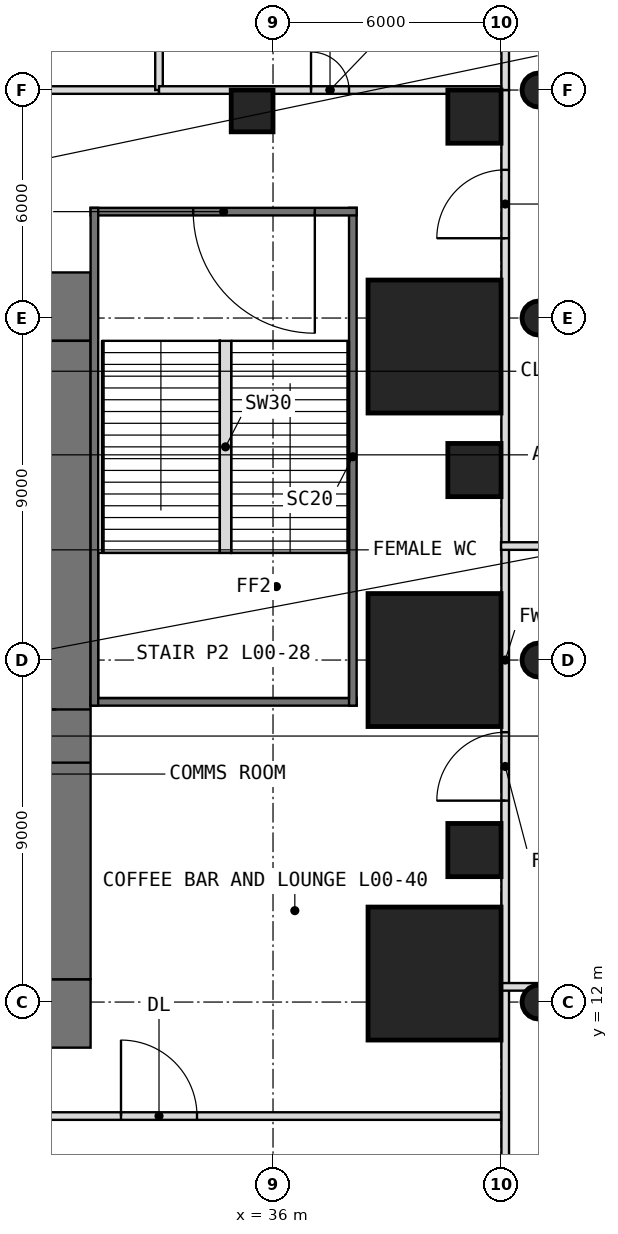
"""IFC4 building model, lengths in metres.
Left out: names, types, materials, properties, quantities, classifications, styles, units other than length and angle.
Written with IfcOpenShell. Run it as: python <this file> out.ifc"""

import sys

from ifc_helpers import new_model, si_unit, direction, frame, frame_2d, origin, origin_2d, place, context, subcontext, project, spatial, rectangle, circle, extrude, element, fill, save


model = new_model("IFC4")
c1 = context("Model", 3, precision=1e-05, world=origin(), true_north=direction((0.0, 1.0)))
c2 = subcontext(c1, "Body", "Model", "MODEL_VIEW")
j1 = project(units=[si_unit("LENGTHUNIT", "METRE"), si_unit("PLANEANGLEUNIT", "RADIAN")], contexts=[c1])
p1 = place(None, origin())
s1 = spatial("IfcSite", under=j1, at=p1, CompositionType="ELEMENT")
p2 = place(p1, origin())
s2 = spatial("IfcBuilding", under=s1, at=p2, CompositionType="ELEMENT")
p3 = place(p2, origin())
s3 = spatial("IfcBuildingStorey", under=s2, at=p3, CompositionType="ELEMENT", Elevation=0.0)
p4 = place(p3, frame((40.25, 12.75, -0.4), z_axis=(0.0, 0.0, 1.0), x_axis=(1.0, 0.0, 0.0)))
e1 = element("IfcColumn", 1, at=p4, inside=s3, PredefinedType="COLUMN", context=c2, shape_type="SweptSolid", body=[
    extrude(rectangle(XDim=3.5, YDim=3.5, at=origin_2d()), origin(), (0.0, 0.0, 1.0), 6.4),
])
p5 = place(p3, frame((43.0, 12.0, -0.4), z_axis=(0.0, 0.0, 1.0), x_axis=(1.0, 0.0, 0.0)))
e2 = element("IfcColumn", 2, at=p5, inside=s3, PredefinedType="COLUMN", context=c2, shape_type="SweptSolid", body=[
    extrude(circle(Radius=0.45, at=origin_2d()), origin(), (0.0, 0.0, 1.0), 6.4),
])
p6 = place(p3, frame((41.3, 16.0, -0.4), z_axis=(0.0, 0.0, 1.0), x_axis=(1.0, 0.0, 0.0)))
e3 = element("IfcColumn", 3, at=p6, inside=s3, PredefinedType="COLUMN", context=c2, shape_type="SweptSolid", body=[
    extrude(rectangle(XDim=1.4, YDim=1.4, at=origin_2d()), origin(), (0.0, 0.0, 1.0), 6.4),
])
p7 = place(p3, frame((40.25, 21.0, -0.4), z_axis=(0.0, 0.0, 1.0), x_axis=(1.0, 0.0, 0.0)))
e4 = element("IfcColumn", 4, at=p7, inside=s3, PredefinedType="COLUMN", context=c2, shape_type="SweptSolid", body=[
    extrude(rectangle(XDim=3.5, YDim=3.5, at=origin_2d()), origin(), (0.0, 0.0, 1.0), 6.4),
])
p8 = place(p3, frame((43.0, 21.0, -0.4), z_axis=(0.0, 0.0, 1.0), x_axis=(1.0, 0.0, 0.0)))
e5 = element("IfcColumn", 5, at=p8, inside=s3, PredefinedType="COLUMN", context=c2, shape_type="SweptSolid", body=[
    extrude(circle(Radius=0.45, at=origin_2d()), origin(), (0.0, 0.0, 1.0), 6.4),
])
p9 = place(p3, frame((41.3, 26.0, -0.4), z_axis=(0.0, 0.0, 1.0), x_axis=(1.0, 0.0, 0.0)))
e6 = element("IfcColumn", 6, at=p9, inside=s3, PredefinedType="COLUMN", context=c2, shape_type="SweptSolid", body=[
    extrude(rectangle(XDim=1.4, YDim=1.4, at=origin_2d()), origin(), (0.0, 0.0, 1.0), 6.4),
])
p10 = place(p3, frame((43.0, 30.0, -0.4), z_axis=(0.0, 0.0, 1.0), x_axis=(1.0, 0.0, 0.0)))
e7 = element("IfcColumn", 7, at=p10, inside=s3, PredefinedType="COLUMN", context=c2, shape_type="SweptSolid", body=[
    extrude(circle(Radius=0.45, at=origin_2d()), origin(), (0.0, 0.0, 1.0), 6.4),
])
p11 = place(p3, frame((40.25, 29.25, -0.4), z_axis=(0.0, 0.0, 1.0), x_axis=(1.0, 0.0, 0.0)))
e8 = element("IfcColumn", 8, at=p11, inside=s3, PredefinedType="COLUMN", context=c2, shape_type="SweptSolid", body=[
    extrude(rectangle(XDim=3.5, YDim=3.5, at=origin_2d()), origin(), (0.0, 0.0, 1.0), 6.4),
])
p12 = place(p3, frame((35.45, 35.45, -0.4), z_axis=(0.0, 0.0, 1.0), x_axis=(1.0, 0.0, 0.0)))
e9 = element("IfcColumn", 9, at=p12, inside=s3, PredefinedType="COLUMN", context=c2, shape_type="SweptSolid", body=[
    extrude(rectangle(XDim=1.1, YDim=1.1, at=origin_2d()), origin(), (0.0, 0.0, 1.0), 6.4),
])
p13 = place(p3, frame((41.3, 35.3, -0.4), z_axis=(0.0, 0.0, 1.0), x_axis=(1.0, 0.0, 0.0)))
e10 = element("IfcColumn", 10, at=p13, inside=s3, PredefinedType="COLUMN", context=c2, shape_type="SweptSolid", body=[
    extrude(rectangle(XDim=1.4, YDim=1.4, at=origin_2d()), origin(), (0.0, 0.0, 1.0), 6.4),
])
p14 = place(p3, frame((43.0, 36.0, -0.4), z_axis=(0.0, 0.0, 1.0), x_axis=(1.0, 0.0, 0.0)))
e11 = element("IfcColumn", 11, at=p14, inside=s3, PredefinedType="COLUMN", context=c2, shape_type="SweptSolid", body=[
    extrude(circle(Radius=0.45, at=origin_2d()), origin(), (0.0, 0.0, 1.0), 6.4),
])
p15 = place(p3, frame((10.8, 11.7, 0.0), z_axis=(0.0, 0.0, 1.0), x_axis=(1.0, 0.0, 0.0)))
e12 = element("IfcWall", 12, at=p15, inside=s3, PredefinedType="SHEAR", context=c2, shape_type="SweptSolid", body=[
    extrude(rectangle(XDim=20.4, YDim=1.8, at=frame_2d((10.2, 0.0))), origin(), (0.0, 0.0, 1.0), 5.8),
])
p16 = place(p15, frame((9.2, 0.0, 0.0)))
e13 = element("IfcOpeningElement", 13, at=p16, cuts=e12, PredefinedType="OPENING", context=c2, shape_type="SweptSolid", body=[
    extrude(rectangle(XDim=2.0, YDim=2.2, at=frame_2d((1.0, 1.1))), frame((0.0, 0.91, 0.0), z_axis=(0.0, -1.0, 0.0), x_axis=(1.0, 0.0, 0.0)), (0.0, 0.0, 1.0), 1.82),
])
p17 = place(p3, frame((10.8, 30.3, 0.0), z_axis=(0.0, 0.0, 1.0), x_axis=(1.0, 0.0, 0.0)))
e14 = element("IfcWall", 14, at=p17, inside=s3, PredefinedType="SHEAR", context=c2, shape_type="SweptSolid", body=[
    extrude(rectangle(XDim=20.4, YDim=1.8, at=frame_2d((10.2, 0.0))), origin(), (0.0, 0.0, 1.0), 5.8),
])
p18 = place(p17, frame((9.2, 0.0, 0.0)))
e15 = element("IfcOpeningElement", 15, at=p18, cuts=e14, PredefinedType="OPENING", context=c2, shape_type="SweptSolid", body=[
    extrude(rectangle(XDim=2.0, YDim=2.2, at=frame_2d((1.0, 1.1))), frame((0.0, 0.91, 0.0), z_axis=(0.0, -1.0, 0.0), x_axis=(1.0, 0.0, 0.0)), (0.0, 0.0, 1.0), 1.82),
])
p19 = place(p3, frame((30.3, 12.6, 0.0), z_axis=(0.0, 0.0, 1.0), x_axis=(0.0, 1.0, 0.0)))
e16 = element("IfcWall", 16, at=p19, inside=s3, PredefinedType="SHEAR", context=c2, shape_type="SweptSolid", body=[
    extrude(rectangle(XDim=16.8, YDim=1.8, at=frame_2d((8.4, 0.0))), origin(), (0.0, 0.0, 1.0), 5.8),
])
p20 = place(p19, frame((5.7, 0.0, 0.0)))
e17 = element("IfcOpeningElement", 17, at=p20, cuts=e16, PredefinedType="OPENING", context=c2, shape_type="SweptSolid", body=[
    extrude(rectangle(XDim=1.4, YDim=2.2, at=frame_2d((0.7, 1.1))), frame((0.0, 0.91, 0.0), z_axis=(0.0, -1.0, 0.0), x_axis=(1.0, 0.0, 0.0)), (0.0, 0.0, 1.0), 1.82),
])
p21 = place(p3, frame((31.2, 19.9, 0.0), z_axis=(0.0, 0.0, 1.0), x_axis=(1.0, 0.0, 0.0)))
e18 = element("IfcWall", 18, at=p21, inside=s3, PredefinedType="SOLIDWALL", context=c2, shape_type="SweptSolid", body=[
    extrude(rectangle(XDim=7.0, YDim=0.2, at=frame_2d((3.5, 0.0))), origin(), (0.0, 0.0, 1.0), 5.8),
])
p22 = place(p3, frame((38.1, 19.8, 0.0), z_axis=(0.0, 0.0, 1.0), x_axis=(0.0, 1.0, 0.0)))
e19 = element("IfcWall", 19, at=p22, inside=s3, PredefinedType="SOLIDWALL", context=c2, shape_type="SweptSolid", body=[
    extrude(rectangle(XDim=13.1, YDim=0.2, at=frame_2d((6.55, 0.0))), origin(), (0.0, 0.0, 1.0), 5.8),
])
p23 = place(p3, frame((38.2, 32.8, 0.0), z_axis=(0.0, 0.0, 1.0), x_axis=(-1.0, 0.0, 0.0)))
e20 = element("IfcWall", 20, at=p23, inside=s3, PredefinedType="SOLIDWALL", context=c2, shape_type="SweptSolid", body=[
    extrude(rectangle(XDim=7.0, YDim=0.2, at=frame_2d((3.5, 0.0))), origin(), (0.0, 0.0, 1.0), 5.8),
])
p24 = place(p23, frame((1.1, 0.0, 0.0)))
e21 = element("IfcOpeningElement", 21, at=p24, cuts=e20, PredefinedType="OPENING", context=c2, shape_type="SweptSolid", body=[
    extrude(rectangle(XDim=3.2, YDim=2.4, at=frame_2d((1.6, 1.2))), frame((0.0, 0.11, 0.0), z_axis=(0.0, -1.0, 0.0), x_axis=(1.0, 0.0, 0.0)), (0.0, 0.0, 1.0), 0.22),
])
p25 = place(p3, frame((31.3, 32.9, 0.0), z_axis=(0.0, 0.0, 1.0), x_axis=(0.0, -1.0, 0.0)))
e22 = element("IfcWall", 22, at=p25, inside=s3, PredefinedType="SOLIDWALL", context=c2, shape_type="SweptSolid", body=[
    extrude(rectangle(XDim=13.1, YDim=0.2, at=frame_2d((6.55, 0.0))), origin(), (0.0, 0.0, 1.0), 5.8),
])
p26 = place(p3, frame((42.11, 6.0, 0.0), z_axis=(0.0, 0.0, 1.0), x_axis=(0.0, 1.0, 0.0)))
e23 = element("IfcWall", 23, at=p26, inside=s3, PredefinedType="PARTITIONING", context=c2, shape_type="SweptSolid", body=[
    extrude(rectangle(XDim=30.0, YDim=0.2, at=frame_2d((15.0, 0.0))), origin(), (0.0, 0.0, 1.0), 5.6),
])
p27 = place(p26, frame((11.3, 0.0, 0.0)))
e24 = element("IfcOpeningElement", 24, at=p27, cuts=e23, PredefinedType="OPENING", context=c2, shape_type="SweptSolid", body=[
    extrude(rectangle(XDim=1.8, YDim=2.4, at=frame_2d((0.9, 1.2))), frame((0.0, 0.11, 0.0), z_axis=(0.0, -1.0, 0.0), x_axis=(1.0, 0.0, 0.0)), (0.0, 0.0, 1.0), 0.22),
])
p28 = place(p26, frame((26.1, 0.0, 0.0)))
e25 = element("IfcOpeningElement", 25, at=p28, cuts=e23, PredefinedType="OPENING", context=c2, shape_type="SweptSolid", body=[
    extrude(rectangle(XDim=1.8, YDim=2.4, at=frame_2d((0.9, 1.2))), frame((0.0, 0.11, 0.0), z_axis=(0.0, -1.0, 0.0), x_axis=(1.0, 0.0, 0.0)), (0.0, 0.0, 1.0), 0.22),
])
p29 = place(p3, frame((42.11, 36.0, 0.0), z_axis=(0.0, 0.0, 1.0), x_axis=(0.0, 1.0, 0.0)))
e26 = element("IfcWall", 26, at=p29, inside=s3, PredefinedType="PARTITIONING", context=c2, shape_type="SweptSolid", body=[
    extrude(rectangle(XDim=6.0, YDim=0.2, at=frame_2d((3.0, 0.0))), origin(), (0.0, 0.0, 1.0), 4.98),
])
p30 = place(p3, frame((0.0, 9.0, 0.0), z_axis=(0.0, 0.0, 1.0), x_axis=(1.0, 0.0, 0.0)))
e27 = element("IfcWall", 27, at=p30, inside=s3, PredefinedType="PARTITIONING", context=c2, shape_type="SweptSolid", body=[
    extrude(rectangle(XDim=42.0, YDim=0.2, at=frame_2d((21.0, 0.0))), origin(), (0.0, 0.0, 1.0), 5.6),
])
p31 = place(p30, frame((11.0, 0.0, 0.0)))
e28 = element("IfcOpeningElement", 28, at=p31, cuts=e27, PredefinedType="OPENING", context=c2, shape_type="SweptSolid", body=[
    extrude(rectangle(XDim=2.0, YDim=2.2, at=frame_2d((1.0, 1.1))), frame((0.0, 0.11, 0.0), z_axis=(0.0, -1.0, 0.0), x_axis=(1.0, 0.0, 0.0)), (0.0, 0.0, 1.0), 0.22),
])
p32 = place(p30, frame((32.0, 0.0, 0.0)))
e29 = element("IfcOpeningElement", 29, at=p32, cuts=e27, PredefinedType="OPENING", context=c2, shape_type="SweptSolid", body=[
    extrude(rectangle(XDim=2.0, YDim=2.2, at=frame_2d((1.0, 1.1))), frame((0.0, 0.11, 0.0), z_axis=(0.0, -1.0, 0.0), x_axis=(1.0, 0.0, 0.0)), (0.0, 0.0, 1.0), 0.22),
])
p33 = place(p3, frame((24.2, 36.0, 0.0), z_axis=(0.0, 0.0, 1.0), x_axis=(1.0, 0.0, 0.0)))
e30 = element("IfcWall", 30, at=p33, inside=s3, PredefinedType="PARTITIONING", context=c2, shape_type="SweptSolid", body=[
    extrude(rectangle(XDim=8.8, YDim=0.2, at=frame_2d((4.4, 0.0))), origin(), (0.0, 0.0, 1.0), 5.6),
])
p34 = place(p33, frame((3.8, 0.0, 0.0)))
e31 = element("IfcOpeningElement", 31, at=p34, cuts=e30, PredefinedType="OPENING", context=c2, shape_type="SweptSolid", body=[
    extrude(rectangle(XDim=1.0, YDim=2.2, at=frame_2d((0.5, 1.1))), frame((0.0, 0.11, 0.0), z_axis=(0.0, -1.0, 0.0), x_axis=(1.0, 0.0, 0.0)), (0.0, 0.0, 1.0), 0.22),
])
p35 = place(p3, frame((33.0, 36.0, 0.0), z_axis=(0.0, 0.0, 1.0), x_axis=(0.0, 1.0, 0.0)))
e32 = element("IfcWall", 32, at=p35, inside=s3, PredefinedType="PARTITIONING", context=c2, shape_type="SweptSolid", body=[
    extrude(rectangle(XDim=6.0, YDim=0.2, at=frame_2d((3.0, 0.0))), origin(), (0.0, 0.0, 1.0), 5.6),
])
p36 = place(p3, frame((33.0, 36.0, 0.0), z_axis=(0.0, 0.0, 1.0), x_axis=(1.0, 0.0, 0.0)))
e33 = element("IfcWall", 33, at=p36, inside=s3, PredefinedType="PARTITIONING", context=c2, shape_type="SweptSolid", body=[
    extrude(rectangle(XDim=9.0, YDim=0.2, at=frame_2d((4.5, 0.0))), origin(), (0.0, 0.0, 1.0), 5.6),
])
p37 = place(p36, frame((4.0, 0.0, 0.0)))
e34 = element("IfcOpeningElement", 34, at=p37, cuts=e33, PredefinedType="OPENING", context=c2, shape_type="SweptSolid", body=[
    extrude(rectangle(XDim=1.0, YDim=2.2, at=frame_2d((0.5, 1.1))), frame((0.0, 0.11, 0.0), z_axis=(0.0, -1.0, 0.0), x_axis=(1.0, 0.0, 0.0)), (0.0, 0.0, 1.0), 0.22),
])
for number, where, z_axis, x_axis in (
    (35, (42.0, 12.4, 0.0), (0.0, 0.0, 1.0), (1.0, 0.0, 0.0)),
    (36, (42.0, 24.0, 0.0), (0.0, 0.0, 1.0), (1.0, 0.0, 0.0)),
):
    element("IfcWall", number, at=place(p3, frame(where, z_axis=z_axis, x_axis=x_axis)), inside=s3, PredefinedType="PARTITIONING", context=c2, shape_type="SweptSolid", body=[
        extrude(rectangle(XDim=21.0, YDim=0.2, at=frame_2d((10.5, 0.0))), origin(), (0.0, 0.0, 1.0), 5.6),
    ])
p38 = place(p3, frame((34.75, 23.82, 0.0), z_axis=(0.0, 0.0, 1.0), x_axis=(0.0, 1.0, 0.0)))
e37 = element("IfcWall", 37, at=p38, inside=s3, PredefinedType="PARTITIONING", context=c2, shape_type="SweptSolid", body=[
    extrude(rectangle(XDim=5.58, YDim=0.3, at=frame_2d((2.79, 0.0))), origin(), (0.0, 0.0, 1.0), 6.0),
])
p39 = place(p20, origin())
e38 = element("IfcDoor", 38, at=p39, inside=s3, OperationType="SINGLE_SWING_RIGHT", PredefinedType="DOOR", context=c2, shape_type="SweptSolid", body=[
    extrude(rectangle(XDim=1.4, YDim=2.2, at=frame_2d((0.7, 1.1))), frame((0.0, 0.025, 0.0), z_axis=(0.0, -1.0, 0.0), x_axis=(1.0, 0.0, 0.0)), (0.0, 0.0, 1.0), 0.05),
])
fill(e17, e38)
p40 = place(p24, origin())
e39 = element("IfcDoor", 39, at=p40, inside=s3, OperationType="DOUBLE_DOOR_SINGLE_SWING", PredefinedType="DOOR", context=c2, shape_type="SweptSolid", body=[
    extrude(rectangle(XDim=3.2, YDim=2.4, at=frame_2d((1.6, 1.2))), frame((0.0, 0.025, 0.0), z_axis=(0.0, -1.0, 0.0), x_axis=(1.0, 0.0, 0.0)), (0.0, 0.0, 1.0), 0.05),
])
fill(e21, e39)
p41 = place(p27, origin())
e40 = element("IfcDoor", 40, at=p41, inside=s3, OperationType="DOUBLE_DOOR_SINGLE_SWING", PredefinedType="DOOR", context=c2, shape_type="SweptSolid", body=[
    extrude(rectangle(XDim=1.8, YDim=2.4, at=frame_2d((0.9, 1.2))), frame((0.0, 0.025, 0.0), z_axis=(0.0, -1.0, 0.0), x_axis=(1.0, 0.0, 0.0)), (0.0, 0.0, 1.0), 0.05),
])
fill(e24, e40)
p42 = place(p28, origin())
e41 = element("IfcDoor", 41, at=p42, inside=s3, OperationType="DOUBLE_DOOR_SINGLE_SWING", PredefinedType="DOOR", context=c2, shape_type="SweptSolid", body=[
    extrude(rectangle(XDim=1.8, YDim=2.4, at=frame_2d((0.9, 1.2))), frame((0.0, 0.025, 0.0), z_axis=(0.0, -1.0, 0.0), x_axis=(1.0, 0.0, 0.0)), (0.0, 0.0, 1.0), 0.05),
])
fill(e25, e41)
p43 = place(p37, origin())
e42 = element("IfcDoor", 42, at=p43, inside=s3, OperationType="SINGLE_SWING_LEFT", PredefinedType="DOOR", context=c2, shape_type="SweptSolid", body=[
    extrude(rectangle(XDim=1.0, YDim=2.2, at=frame_2d((0.5, 1.1))), frame((0.0, 0.025, 0.0), z_axis=(0.0, -1.0, 0.0), x_axis=(1.0, 0.0, 0.0)), (0.0, 0.0, 1.0), 0.05),
])
fill(e34, e42)
p44 = place(p32, origin())
e43 = element("IfcDoor", 43, at=p44, inside=s3, OperationType="DOUBLE_DOOR_SINGLE_SWING", PredefinedType="DOOR", context=c2, shape_type="SweptSolid", body=[
    extrude(rectangle(XDim=2.0, YDim=2.2, at=frame_2d((1.0, 1.1))), frame((0.0, 0.025, 0.0), z_axis=(0.0, -1.0, 0.0), x_axis=(1.0, 0.0, 0.0)), (0.0, 0.0, 1.0), 0.05),
])
fill(e29, e43)
save(model, sys.argv[1])
